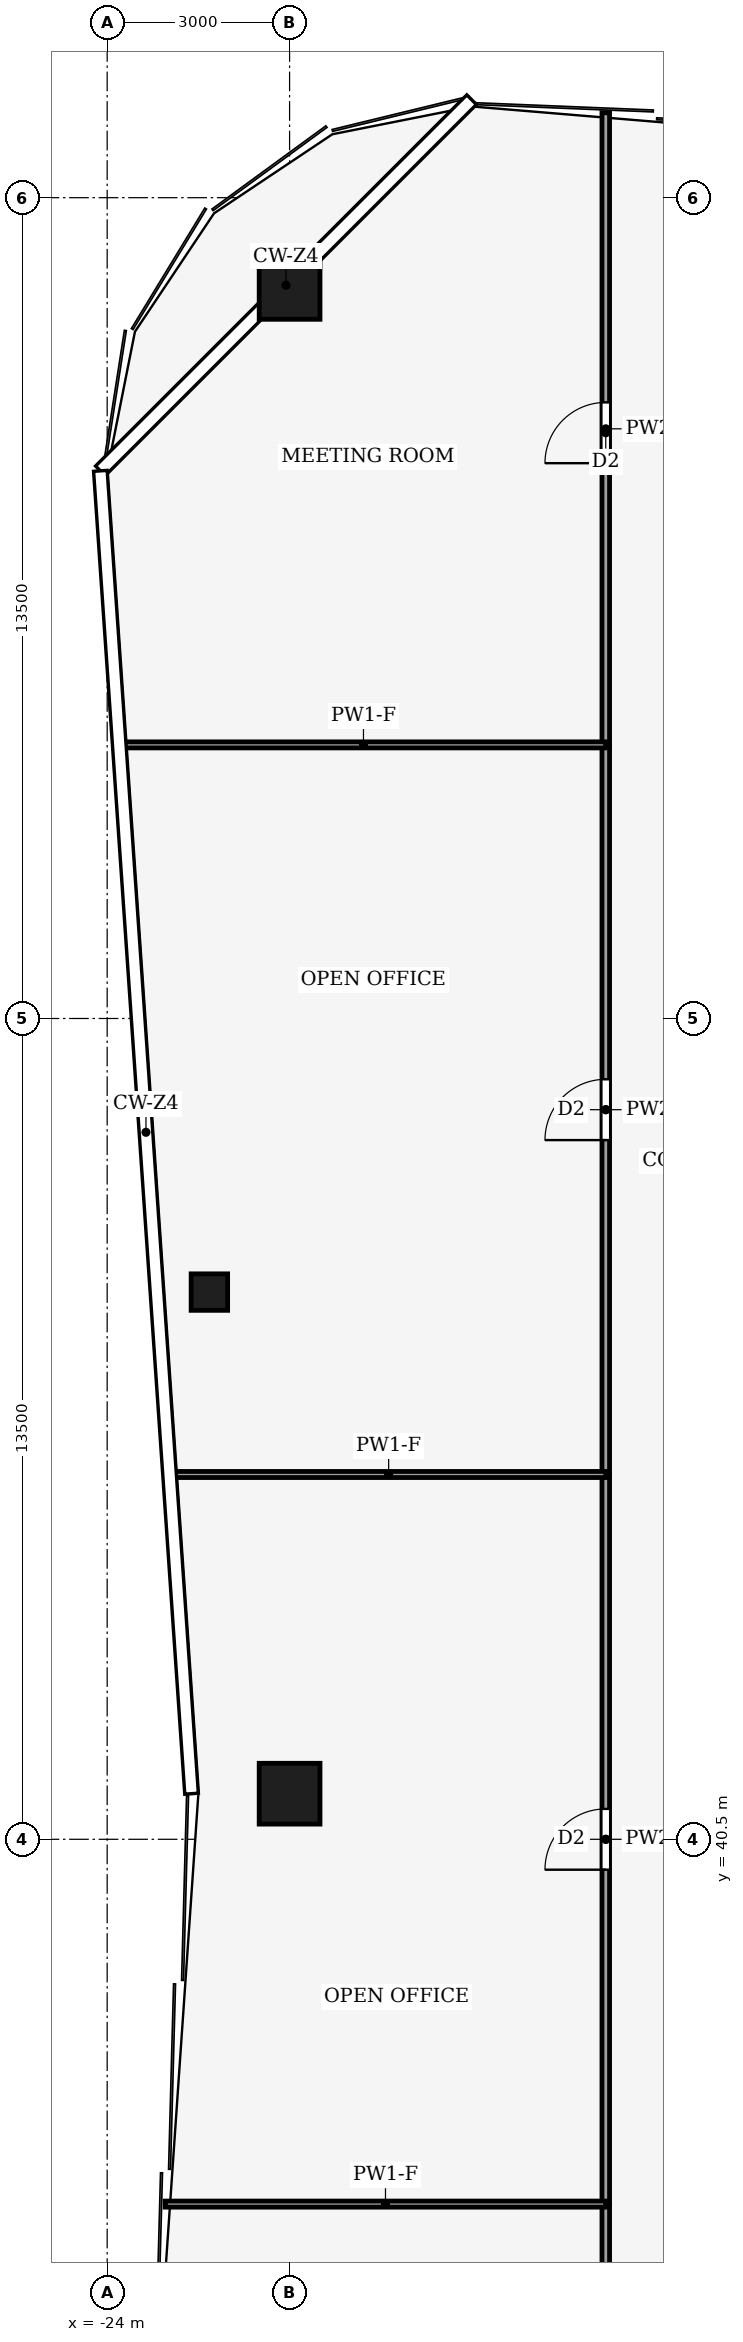
"""IFC4 building model, lengths in metres.
Left out: names, types, materials, properties, quantities, classifications, styles, units other than length and angle.
Written with IfcOpenShell. Run it as: python <this file> out.ifc"""

import sys

from ifc_helpers import new_model, si_unit, direction, frame, frame_2d, origin, origin_2d, place, context, subcontext, project, spatial, rectangle, hollow_rectangle, extrude, element, fill, save


model = new_model("IFC4")
c1 = context("Model", 3, precision=1e-05, world=origin(), true_north=direction((0.0, 1.0)))
c2 = subcontext(c1, "Body", "Model", "MODEL_VIEW")
j1 = project(units=[si_unit("LENGTHUNIT", "METRE"), si_unit("PLANEANGLEUNIT", "RADIAN")], contexts=[c1])
p1 = place(None, origin())
s1 = spatial("IfcSite", under=j1, at=p1, CompositionType="ELEMENT")
p2 = place(p1, origin())
s2 = spatial("IfcBuilding", under=s1, at=p2, CompositionType="ELEMENT")
p3 = place(p2, frame((0.0, 0.0, 242.0)))
s3 = spatial("IfcBuildingStorey", under=s2, at=p3, CompositionType="ELEMENT", Elevation=242.0)
for number, where, z_axis, x_axis in (
    (1, (-21.0, 66.0, 0.0), (0.0, 0.0, 1.0), (1.0, 0.0, 0.0)),
    (2, (-21.0, 41.25, 0.0), (0.0, 0.0, 1.0), (1.0, 0.0, 0.0)),
):
    element("IfcColumn", number, at=place(p3, frame(where, z_axis=z_axis, x_axis=x_axis)), inside=s3, PredefinedType="COLUMN", context=c2, shape_type="SweptSolid", body=[
        extrude(hollow_rectangle(XDim=1.0, YDim=1.0, WallThickness=0.045, at=origin_2d()), origin(), (0.0, 0.0, 1.0), 4.0),
    ])
p4 = place(p3, frame((-22.319, 49.5, 0.0), z_axis=(0.0, 0.0, 1.0), x_axis=(1.0, 0.0, 0.0)))
e3 = element("IfcColumn", 3, at=p4, inside=s3, PredefinedType="COLUMN", context=c2, shape_type="SweptSolid", body=[
    extrude(hollow_rectangle(XDim=0.6, YDim=0.6, WallThickness=0.025, at=origin_2d()), origin(), (0.0, 0.0, 1.0), 4.0),
])
p5 = place(p3, frame((-15.8, 25.5, 0.0), z_axis=(0.0, 0.0, 1.0), x_axis=(0.0, 1.0, 0.0)))
e4 = element("IfcWall", 4, at=p5, inside=s3, PredefinedType="PARTITIONING", context=c2, shape_type="SweptSolid", body=[
    extrude(rectangle(XDim=9.0, YDim=0.125, at=frame_2d((4.5, 0.0))), origin(), (0.0, 0.0, 1.0), 3.48),
])
p6 = place(p5, frame((4.0, 0.0, 0.0)))
e5 = element("IfcOpeningElement", 5, at=p6, cuts=e4, PredefinedType="OPENING", context=c2, shape_type="SweptSolid", body=[
    extrude(rectangle(XDim=1.0, YDim=2.1, at=frame_2d((0.5, 1.05))), frame((0.0, 0.073, 0.0), z_axis=(0.0, -1.0, 0.0), x_axis=(1.0, 0.0, 0.0)), (0.0, 0.0, 1.0), 0.145),
])
p7 = place(p3, frame((-15.8, 34.5, 0.0), z_axis=(0.0, 0.0, 1.0), x_axis=(0.0, 1.0, 0.0)))
e6 = element("IfcWall", 6, at=p7, inside=s3, PredefinedType="PARTITIONING", context=c2, shape_type="SweptSolid", body=[
    extrude(rectangle(XDim=12.0, YDim=0.125, at=frame_2d((6.0, 0.0))), origin(), (0.0, 0.0, 1.0), 3.14),
])
p8 = place(p7, frame((5.5, 0.0, 0.0)))
e7 = element("IfcOpeningElement", 7, at=p8, cuts=e6, PredefinedType="OPENING", context=c2, shape_type="SweptSolid", body=[
    extrude(rectangle(XDim=1.0, YDim=2.1, at=frame_2d((0.5, 1.05))), frame((0.0, 0.073, 0.0), z_axis=(0.0, -1.0, 0.0), x_axis=(1.0, 0.0, 0.0)), (0.0, 0.0, 1.0), 0.145),
])
p9 = place(p3, frame((-15.8, 46.5, 0.0), z_axis=(0.0, 0.0, 1.0), x_axis=(0.0, 1.0, 0.0)))
e8 = element("IfcWall", 8, at=p9, inside=s3, PredefinedType="PARTITIONING", context=c2, shape_type="SweptSolid", body=[
    extrude(rectangle(XDim=12.0, YDim=0.125, at=frame_2d((6.0, 0.0))), origin(), (0.0, 0.0, 1.0), 3.24),
])
p10 = place(p9, frame((5.5, 0.0, 0.0)))
e9 = element("IfcOpeningElement", 9, at=p10, cuts=e8, PredefinedType="OPENING", context=c2, shape_type="SweptSolid", body=[
    extrude(rectangle(XDim=1.0, YDim=2.1, at=frame_2d((0.5, 1.05))), frame((0.0, 0.073, 0.0), z_axis=(0.0, -1.0, 0.0), x_axis=(1.0, 0.0, 0.0)), (0.0, 0.0, 1.0), 0.145),
])
p11 = place(p3, frame((-15.8, 58.5, 0.0), z_axis=(0.0, 0.0, 1.0), x_axis=(0.0, 1.0, 0.0)))
e10 = element("IfcWall", 10, at=p11, inside=s3, PredefinedType="PARTITIONING", context=c2, shape_type="SweptSolid", body=[
    extrude(rectangle(XDim=10.397, YDim=0.125, at=frame_2d((5.198, 0.0))), origin(), (0.0, 0.0, 1.0), 3.04),
])
p12 = place(p11, frame((4.633, 0.0, 0.0)))
e11 = element("IfcOpeningElement", 11, at=p12, cuts=e10, PredefinedType="OPENING", context=c2, shape_type="SweptSolid", body=[
    extrude(rectangle(XDim=1.0, YDim=2.1, at=frame_2d((0.5, 1.05))), frame((0.0, 0.073, 0.0), z_axis=(0.0, -1.0, 0.0), x_axis=(1.0, 0.0, 0.0)), (0.0, 0.0, 1.0), 0.145),
])
p13 = place(p3, frame((-15.8, 34.5, 0.0), z_axis=(0.0, 0.0, 1.0), x_axis=(-1.0, 0.0, 0.0)))
e12 = element("IfcWall", 12, at=p13, inside=s3, PredefinedType="PARTITIONING", context=c2, shape_type="SweptSolid", body=[
    extrude(rectangle(XDim=7.245, YDim=0.1, at=frame_2d((3.623, 0.0))), origin(), (0.0, 0.0, 1.0), 3.04),
])
p14 = place(p3, frame((-15.8, 46.5, 0.0), z_axis=(0.0, 0.0, 1.0), x_axis=(-1.0, 0.0, 0.0)))
e13 = element("IfcWall", 13, at=p14, inside=s3, PredefinedType="PARTITIONING", context=c2, shape_type="SweptSolid", body=[
    extrude(rectangle(XDim=7.142, YDim=0.1, at=frame_2d((3.571, 0.0))), origin(), (0.0, 0.0, 1.0), 3.04),
])
p15 = place(p3, frame((-15.8, 58.5, 0.0), z_axis=(0.0, 0.0, 1.0), x_axis=(-1.0, 0.0, 0.0)))
e14 = element("IfcWall", 14, at=p15, inside=s3, PredefinedType="PARTITIONING", context=c2, shape_type="SweptSolid", body=[
    extrude(rectangle(XDim=7.97, YDim=0.1, at=frame_2d((3.985, 0.0))), origin(), (0.0, 0.0, 1.0), 3.04),
])
p16 = place(p8, origin())
e15 = element("IfcDoor", 15, at=p16, inside=s3, OperationType="SINGLE_SWING_RIGHT", PredefinedType="DOOR", context=c2, shape_type="SweptSolid", body=[
    extrude(rectangle(XDim=1.0, YDim=2.1, at=frame_2d((0.5, 1.05))), frame((0.0, 0.025, 0.0), z_axis=(0.0, -1.0, 0.0), x_axis=(1.0, 0.0, 0.0)), (0.0, 0.0, 1.0), 0.05),
])
fill(e7, e15)
p17 = place(p10, origin())
e16 = element("IfcDoor", 16, at=p17, inside=s3, OperationType="SINGLE_SWING_LEFT", PredefinedType="DOOR", context=c2, shape_type="SweptSolid", body=[
    extrude(rectangle(XDim=1.0, YDim=2.1, at=frame_2d((0.5, 1.05))), frame((0.0, 0.025, 0.0), z_axis=(0.0, -1.0, 0.0), x_axis=(1.0, 0.0, 0.0)), (0.0, 0.0, 1.0), 0.05),
])
fill(e9, e16)
p18 = place(p12, origin())
e17 = element("IfcDoor", 17, at=p18, inside=s3, OperationType="SINGLE_SWING_LEFT", PredefinedType="DOOR", context=c2, shape_type="SweptSolid", body=[
    extrude(rectangle(XDim=1.0, YDim=2.1, at=frame_2d((0.5, 1.05))), frame((0.0, 0.025, 0.0), z_axis=(0.0, -1.0, 0.0), x_axis=(1.0, 0.0, 0.0)), (0.0, 0.0, 1.0), 0.05),
])
fill(e11, e17)
save(model, sys.argv[1])
